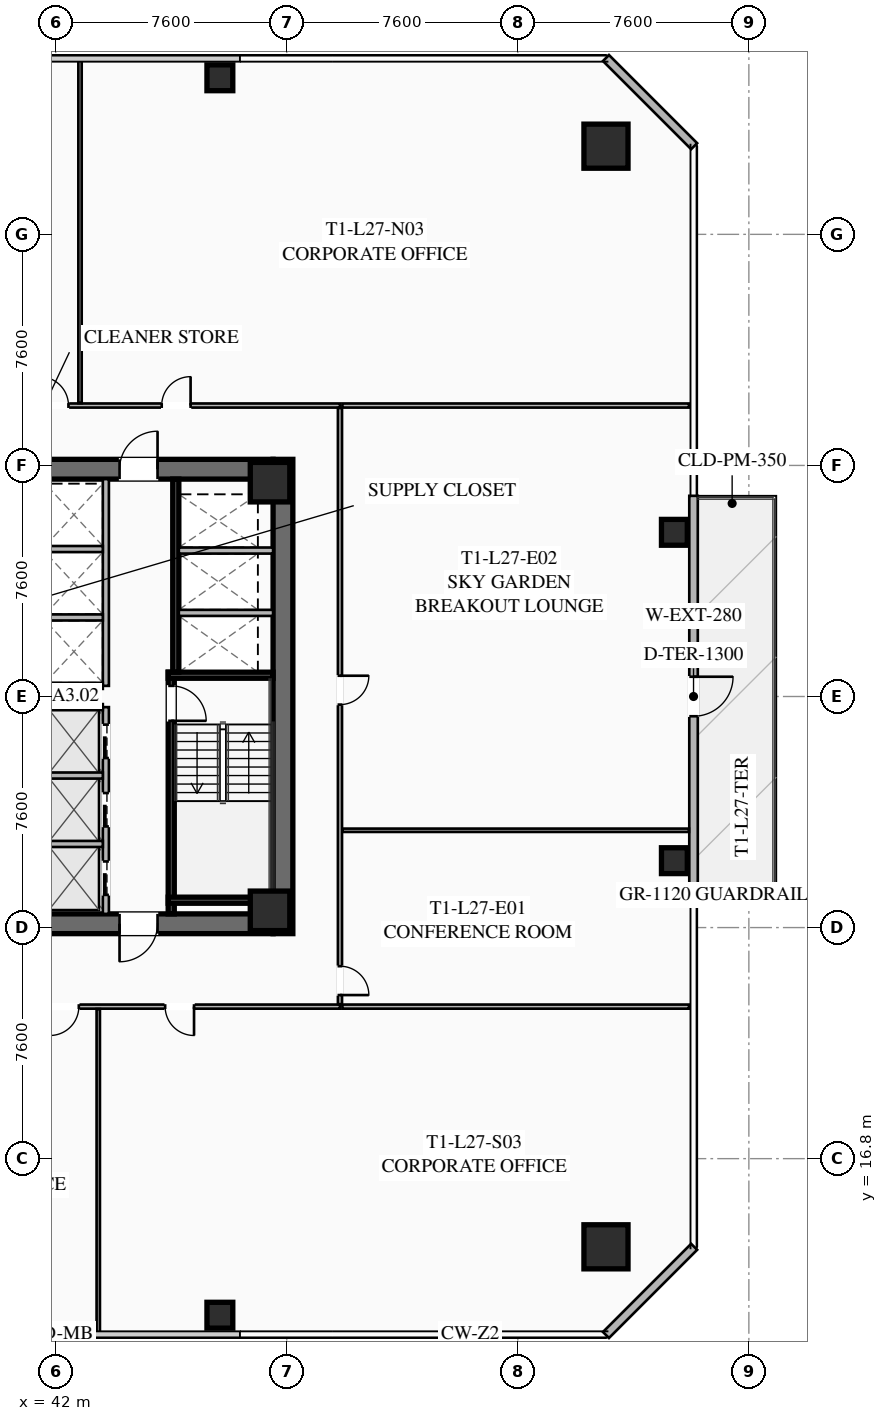
"""IFC4 building model, lengths in metres.
Left out: names, types, materials, properties, quantities, classifications, styles, units other than length and angle.
Written with IfcOpenShell. Run it as: python <this file> out.ifc"""

import sys

from ifc_helpers import new_model, si_unit, direction, frame, frame_2d, origin, origin_2d, place, context, subcontext, project, spatial, rectangle, hollow_rectangle, extrude, element, fill, save


model = new_model("IFC4")
c1 = context("Model", 3, precision=1e-05, world=origin(), true_north=direction((0.0, 1.0)))
c2 = subcontext(c1, "Body", "Model", "MODEL_VIEW")
j1 = project(units=[si_unit("LENGTHUNIT", "METRE"), si_unit("PLANEANGLEUNIT", "RADIAN")], contexts=[c1])
p1 = place(None, origin())
s1 = spatial("IfcSite", under=j1, at=p1, CompositionType="ELEMENT")
p2 = place(p1, origin())
s2 = spatial("IfcBuilding", under=s1, at=p2, CompositionType="ELEMENT")
p3 = place(p2, frame((0.0, 0.0, 102.7)))
s3 = spatial("IfcBuildingStorey", under=s2, at=p3, CompositionType="ELEMENT", Elevation=102.7)
p4 = place(p3, frame((49.475, 39.8, 0.0), z_axis=(0.0, 0.0, 1.0), x_axis=(0.0, -1.0, 0.0)))
e1 = element("IfcWall", 1, at=p4, inside=s3, PredefinedType="SHEAR", context=c2, shape_type="SweptSolid", body=[
    extrude(rectangle(XDim=15.6, YDim=0.65, at=frame_2d((7.8, 0.0))), origin(), (0.0, 0.0, 1.0), 3.55),
])
p5 = place(p3, frame((49.15, 24.525, 0.0), z_axis=(0.0, 0.0, 1.0), x_axis=(-1.0, 0.0, 0.0)))
e2 = element("IfcWall", 2, at=p5, inside=s3, PredefinedType="SHEAR", context=c2, shape_type="SweptSolid", body=[
    extrude(rectangle(XDim=14.3, YDim=0.65, at=frame_2d((7.15, 0.0))), origin(), (0.0, 0.0, 1.0), 3.55),
])
p6 = place(p5, frame((8.85, 0.0, 0.0)))
e3 = element("IfcOpeningElement", 3, at=p6, cuts=e2, PredefinedType="OPENING", context=c2, shape_type="SweptSolid", body=[
    extrude(rectangle(XDim=1.25, YDim=2.25, at=frame_2d((0.625, 1.125))), frame((0.0, 0.335, 0.0), z_axis=(0.0, -1.0, 0.0), x_axis=(1.0, 0.0, 0.0)), (0.0, 0.0, 1.0), 0.67),
])
p7 = place(p5, frame((3.8, 0.0, 0.0)))
e4 = element("IfcOpeningElement", 4, at=p7, cuts=e2, PredefinedType="OPENING", context=c2, shape_type="SweptSolid", body=[
    extrude(rectangle(XDim=1.25, YDim=2.25, at=frame_2d((0.625, 1.125))), frame((0.0, 0.335, 0.0), z_axis=(0.0, -1.0, 0.0), x_axis=(1.0, 0.0, 0.0)), (0.0, 0.0, 1.0), 0.67),
])
p8 = place(p3, frame((34.85, 39.475, 0.0), z_axis=(0.0, 0.0, 1.0), x_axis=(1.0, 0.0, 0.0)))
e5 = element("IfcWall", 5, at=p8, inside=s3, PredefinedType="SHEAR", context=c2, shape_type="SweptSolid", body=[
    extrude(rectangle(XDim=14.3, YDim=0.65, at=frame_2d((7.15, 0.0))), origin(), (0.0, 0.0, 1.0), 3.55),
])
p9 = place(p8, frame((4.2, 0.0, 0.0)))
e6 = element("IfcOpeningElement", 6, at=p9, cuts=e5, PredefinedType="OPENING", context=c2, shape_type="SweptSolid", body=[
    extrude(rectangle(XDim=1.25, YDim=2.25, at=frame_2d((0.625, 1.125))), frame((0.0, 0.335, 0.0), z_axis=(0.0, -1.0, 0.0), x_axis=(1.0, 0.0, 0.0)), (0.0, 0.0, 1.0), 0.67),
])
p10 = place(p8, frame((9.25, 0.0, 0.0)))
e7 = element("IfcOpeningElement", 7, at=p10, cuts=e5, PredefinedType="OPENING", context=c2, shape_type="SweptSolid", body=[
    extrude(rectangle(XDim=1.25, YDim=2.25, at=frame_2d((0.625, 1.125))), frame((0.0, 0.335, 0.0), z_axis=(0.0, -1.0, 0.0), x_axis=(1.0, 0.0, 0.0)), (0.0, 0.0, 1.0), 0.67),
])
for number, where, z_axis, x_axis in (
    (8, (49.05, 24.95, 0.0), (0.0, 0.0, 1.0), (1.0, 0.0, 0.0)),
    (9, (49.05, 39.05, 0.0), (0.0, 0.0, 1.0), (1.0, 0.0, 0.0)),
):
    element("IfcColumn", number, at=place(p3, frame(where, z_axis=z_axis, x_axis=x_axis)), inside=s3, PredefinedType="COLUMN", context=c2, shape_type="SweptSolid", body=[
        extrude(hollow_rectangle(XDim=1.3, YDim=1.3, WallThickness=0.05, at=origin_2d()), origin(), (0.0, 0.0, 1.0), 3.35),
    ])
for number, where, z_axis, x_axis in (
    (10, (60.1, 13.9, 0.0), (0.0, 0.0, 1.0), (1.0, 0.0, 0.0)),
    (11, (60.1, 50.1, 0.0), (0.0, 0.0, 1.0), (1.0, 0.0, 0.0)),
):
    element("IfcColumn", number, at=place(p3, frame(where, z_axis=z_axis, x_axis=x_axis)), inside=s3, PredefinedType="COLUMN", context=c2, shape_type="SweptSolid", body=[
        extrude(hollow_rectangle(XDim=1.45, YDim=1.45, WallThickness=0.055, at=origin_2d()), origin(), (0.0, 0.0, 1.0), 3.35),
    ])
for number, where, z_axis, x_axis in (
    (12, (47.4, 11.65, 0.0), (0.0, 0.0, 1.0), (1.0, 0.0, 0.0)),
    (13, (62.35, 26.6, 0.0), (0.0, 0.0, 1.0), (1.0, 0.0, 0.0)),
    (14, (62.35, 37.4, 0.0), (0.0, 0.0, 1.0), (1.0, 0.0, 0.0)),
    (15, (47.4, 52.35, 0.0), (0.0, 0.0, 1.0), (1.0, 0.0, 0.0)),
):
    element("IfcColumn", number, at=place(p3, frame(where, z_axis=z_axis, x_axis=x_axis)), inside=s3, PredefinedType="COLUMN", context=c2, shape_type="SweptSolid", body=[
        extrude(hollow_rectangle(XDim=0.85, YDim=0.85, WallThickness=0.035, at=origin_2d()), origin(), (0.0, 0.0, 1.0), 3.35),
    ])
p11 = place(p3, frame((62.98, 38.6, 0.0), z_axis=(0.0, 0.0, 1.0), x_axis=(0.0, -1.0, 0.0)))
e16 = element("IfcWall", 16, at=p11, inside=s3, PredefinedType="SOLIDWALL", context=c2, shape_type="SweptSolid", body=[
    extrude(rectangle(XDim=13.2, YDim=0.28, at=frame_2d((6.6, 0.0))), origin(), (0.0, 0.0, 1.0), 3.35),
])
p12 = place(p11, frame((5.95, 0.0, 0.0)))
e17 = element("IfcOpeningElement", 17, at=p12, cuts=e16, PredefinedType="OPENING", context=c2, shape_type="SweptSolid", body=[
    extrude(rectangle(XDim=1.3, YDim=2.15, at=frame_2d((0.65, 1.075))), frame((0.0, 0.15, 0.0), z_axis=(0.0, -1.0, 0.0), x_axis=(1.0, 0.0, 0.0)), (0.0, 0.0, 1.0), 0.3),
])
for number, where, z_axis, x_axis in (
    (18, (60.1, 53.0, 0.0), (0.0, 0.0, 1.0), (0.707, -0.707, 0.0)),
    (19, (63.0, 13.9, 0.0), (0.0, 0.0, 1.0), (-0.707, -0.707, 0.0)),
):
    element("IfcWall", number, at=place(p3, frame(where, z_axis=z_axis, x_axis=x_axis)), inside=s3, PredefinedType="SOLIDWALL", context=c2, shape_type="SweptSolid", body=[
        extrude(rectangle(XDim=4.101, YDim=0.28, at=frame_2d((2.051, 0.0))), origin(), (0.0, 0.0, 1.0), 3.35),
    ])
p13 = place(p3, frame((45.8, 32.8, 0.0), z_axis=(0.0, 0.0, 1.0), x_axis=(0.0, -1.0, 0.0)))
e20 = element("IfcWall", 20, at=p13, inside=s3, PredefinedType="SHEAR", context=c2, shape_type="SweptSolid", body=[
    extrude(rectangle(XDim=7.95, YDim=0.2, at=frame_2d((3.975, 0.0))), origin(), (0.0, 0.0, 1.0), 3.35),
])
p14 = place(p13, frame((0.45, 0.0, 0.0)))
e21 = element("IfcOpeningElement", 21, at=p14, cuts=e20, PredefinedType="OPENING", context=c2, shape_type="SweptSolid", body=[
    extrude(rectangle(XDim=1.15, YDim=2.2, at=frame_2d((0.575, 1.1))), frame((0.0, 0.11, 0.0), z_axis=(0.0, -1.0, 0.0), x_axis=(1.0, 0.0, 0.0)), (0.0, 0.0, 1.0), 0.22),
])
for number, where, z_axis, x_axis in (
    (22, (45.7, 32.7, 0.0), (0.0, 0.0, 1.0), (1.0, 0.0, 0.0)),
    (23, (45.7, 25.3, 0.0), (0.0, 0.0, 1.0), (1.0, 0.0, 0.0)),
):
    element("IfcWall", number, at=place(p3, frame(where, z_axis=z_axis, x_axis=x_axis)), inside=s3, PredefinedType="SHEAR", context=c2, shape_type="SweptSolid", body=[
        extrude(rectangle(XDim=3.45, YDim=0.2, at=frame_2d((1.725, 0.0))), origin(), (0.0, 0.0, 1.0), 3.35),
    ])
p15 = place(p3, frame((45.95, 39.15, 0.0), z_axis=(0.0, 0.0, 1.0), x_axis=(0.0, -1.0, 0.0)))
e24 = element("IfcWall", 24, at=p15, inside=s3, PredefinedType="SHEAR", context=c2, shape_type="SweptSolid", body=[
    extrude(rectangle(XDim=6.35, YDim=0.2, at=frame_2d((3.175, 0.0))), origin(), (0.0, 0.0, 1.0), 3.35),
])
for number, where, z_axis, x_axis in (
    (25, (46.05, 34.75, 0.0), (0.0, 0.0, 1.0), (1.0, 0.0, 0.0)),
    (26, (46.05, 36.8, 0.0), (0.0, 0.0, 1.0), (1.0, 0.0, 0.0)),
):
    element("IfcWall", number, at=place(p3, frame(where, z_axis=z_axis, x_axis=x_axis)), inside=s3, PredefinedType="SOLIDWALL", context=c2, shape_type="SweptSolid", body=[
        extrude(rectangle(XDim=3.1, YDim=0.2, at=frame_2d((1.55, 0.0))), origin(), (0.0, 0.0, 1.0), 3.35),
    ])
p16 = place(p3, frame((43.65, 24.85, 0.0), z_axis=(0.0, 0.0, 1.0), x_axis=(0.0, 1.0, 0.0)))
e27 = element("IfcWall", 27, at=p16, inside=s3, PredefinedType="SOLIDWALL", context=c2, shape_type="SweptSolid", body=[
    extrude(rectangle(XDim=6.8, YDim=0.2, at=frame_2d((3.4, 0.0))), origin(), (0.0, 0.0, 1.0), 3.35),
])
p17 = place(p16, frame((0.625, 0.0, 0.0)))
e28 = element("IfcOpeningElement", 28, at=p17, cuts=e27, PredefinedType="OPENING", context=c2, shape_type="SweptSolid", body=[
    extrude(rectangle(XDim=1.1, YDim=2.2, at=frame_2d((0.55, 1.1))), frame((0.0, 0.11, 0.0), z_axis=(0.0, -1.0, 0.0), x_axis=(1.0, 0.0, 0.0)), (0.0, 0.0, 1.0), 0.22),
])
p18 = place(p16, frame((2.875, 0.0, 0.0)))
e29 = element("IfcOpeningElement", 29, at=p18, cuts=e27, PredefinedType="OPENING", context=c2, shape_type="SweptSolid", body=[
    extrude(rectangle(XDim=1.1, YDim=2.2, at=frame_2d((0.55, 1.1))), frame((0.0, 0.11, 0.0), z_axis=(0.0, -1.0, 0.0), x_axis=(1.0, 0.0, 0.0)), (0.0, 0.0, 1.0), 0.22),
])
p19 = place(p16, frame((5.125, 0.0, 0.0)))
e30 = element("IfcOpeningElement", 30, at=p19, cuts=e27, PredefinedType="OPENING", context=c2, shape_type="SweptSolid", body=[
    extrude(rectangle(XDim=1.1, YDim=2.2, at=frame_2d((0.55, 1.1))), frame((0.0, 0.11, 0.0), z_axis=(0.0, -1.0, 0.0), x_axis=(1.0, 0.0, 0.0)), (0.0, 0.0, 1.0), 0.22),
])
for number, where, z_axis, x_axis in (
    (31, (41.67, 27.15, 0.0), (0.0, 0.0, 1.0), (1.0, 0.0, 0.0)),
    (32, (41.67, 29.4, 0.0), (0.0, 0.0, 1.0), (1.0, 0.0, 0.0)),
    (33, (41.67, 31.65, 0.0), (0.0, 0.0, 1.0), (1.0, 0.0, 0.0)),
):
    element("IfcWall", number, at=place(p3, frame(where, z_axis=z_axis, x_axis=x_axis)), inside=s3, PredefinedType="SOLIDWALL", context=c2, shape_type="SweptSolid", body=[
        extrude(rectangle(XDim=1.88, YDim=0.2, at=frame_2d((0.94, 0.0))), origin(), (0.0, 0.0, 1.0), 3.35),
    ])
p20 = place(p3, frame((43.65, 32.35, 0.0), z_axis=(0.0, 0.0, 1.0), x_axis=(0.0, 1.0, 0.0)))
e34 = element("IfcWall", 34, at=p20, inside=s3, PredefinedType="SOLIDWALL", context=c2, shape_type="SweptSolid", body=[
    extrude(rectangle(XDim=6.8, YDim=0.2, at=frame_2d((3.4, 0.0))), origin(), (0.0, 0.0, 1.0), 3.35),
])
for number, where, z_axis, x_axis in (
    (35, (41.67, 32.35, 0.0), (0.0, 0.0, 1.0), (1.0, 0.0, 0.0)),
    (36, (41.67, 34.6, 0.0), (0.0, 0.0, 1.0), (1.0, 0.0, 0.0)),
    (37, (41.67, 36.85, 0.0), (0.0, 0.0, 1.0), (1.0, 0.0, 0.0)),
):
    element("IfcWall", number, at=place(p3, frame(where, z_axis=z_axis, x_axis=x_axis)), inside=s3, PredefinedType="SOLIDWALL", context=c2, shape_type="SweptSolid", body=[
        extrude(rectangle(XDim=1.88, YDim=0.2, at=frame_2d((0.94, 0.0))), origin(), (0.0, 0.0, 1.0), 3.35),
    ])
p21 = place(p3, frame((24.05, 41.57, 0.0), z_axis=(0.0, 0.0, 1.0), x_axis=(1.0, 0.0, 0.0)))
e38 = element("IfcWall", 38, at=p21, inside=s3, PredefinedType="PARTITIONING", context=c2, shape_type="SweptSolid", body=[
    extrude(rectangle(XDim=27.3, YDim=0.135, at=frame_2d((13.65, 0.0))), origin(), (0.0, 0.0, 1.0), 2.703),
])
p22 = place(p21, frame((0.3, 0.0, 0.0)))
e39 = element("IfcOpeningElement", 39, at=p22, cuts=e38, PredefinedType="OPENING", context=c2, shape_type="SweptSolid", body=[
    extrude(rectangle(XDim=0.95, YDim=2.05, at=frame_2d((0.475, 1.025))), frame((0.0, 0.077, 0.0), z_axis=(0.0, -1.0, 0.0), x_axis=(1.0, 0.0, 0.0)), (0.0, 0.0, 1.0), 0.155),
])
p23 = place(p21, frame((17.42, 0.0, 0.0)))
e40 = element("IfcOpeningElement", 40, at=p23, cuts=e38, PredefinedType="OPENING", context=c2, shape_type="SweptSolid", body=[
    extrude(rectangle(XDim=0.95, YDim=2.05, at=frame_2d((0.475, 1.025))), frame((0.0, 0.077, 0.0), z_axis=(0.0, -1.0, 0.0), x_axis=(1.0, 0.0, 0.0)), (0.0, 0.0, 1.0), 0.155),
])
p24 = place(p21, frame((21.437, 0.0, 0.0)))
e41 = element("IfcOpeningElement", 41, at=p24, cuts=e38, PredefinedType="OPENING", context=c2, shape_type="SweptSolid", body=[
    extrude(rectangle(XDim=0.95, YDim=2.05, at=frame_2d((0.475, 1.025))), frame((0.0, 0.077, 0.0), z_axis=(0.0, -1.0, 0.0), x_axis=(1.0, 0.0, 0.0)), (0.0, 0.0, 1.0), 0.155),
])
p25 = place(p3, frame((42.8, 41.65, 0.0), z_axis=(0.0, 0.0, 1.0), x_axis=(0.0, 1.0, 0.0)))
e42 = element("IfcWall", 42, at=p25, inside=s3, PredefinedType="PARTITIONING", context=c2, shape_type="SweptSolid", body=[
    extrude(rectangle(XDim=11.33, YDim=0.11, at=frame_2d((5.665, 0.0))), origin(), (0.0, 0.0, 1.0), 2.703),
])
p26 = place(p3, frame((51.35, 21.8, 0.0), z_axis=(0.0, 0.0, 1.0), x_axis=(-1.0, 0.0, 0.0)))
e43 = element("IfcWall", 43, at=p26, inside=s3, PredefinedType="PARTITIONING", context=c2, shape_type="SweptSolid", body=[
    extrude(rectangle(XDim=27.3, YDim=0.135, at=frame_2d((13.65, 0.0))), origin(), (0.0, 0.0, 1.0), 2.703),
])
p27 = place(p26, frame((25.97, 0.0, 0.0)))
e44 = element("IfcOpeningElement", 44, at=p27, cuts=e43, PredefinedType="OPENING", context=c2, shape_type="SweptSolid", body=[
    extrude(rectangle(XDim=0.95, YDim=2.05, at=frame_2d((0.475, 1.025))), frame((0.0, 0.077, 0.0), z_axis=(0.0, -1.0, 0.0), x_axis=(1.0, 0.0, 0.0)), (0.0, 0.0, 1.0), 0.155),
])
p28 = place(p26, frame((8.59, 0.0, 0.0)))
e45 = element("IfcOpeningElement", 45, at=p28, cuts=e43, PredefinedType="OPENING", context=c2, shape_type="SweptSolid", body=[
    extrude(rectangle(XDim=0.95, YDim=2.05, at=frame_2d((0.475, 1.025))), frame((0.0, 0.077, 0.0), z_axis=(0.0, -1.0, 0.0), x_axis=(1.0, 0.0, 0.0)), (0.0, 0.0, 1.0), 0.155),
])
p29 = place(p26, frame((4.8, 0.0, 0.0)))
e46 = element("IfcOpeningElement", 46, at=p29, cuts=e43, PredefinedType="OPENING", context=c2, shape_type="SweptSolid", body=[
    extrude(rectangle(XDim=0.95, YDim=2.05, at=frame_2d((0.475, 1.025))), frame((0.0, 0.077, 0.0), z_axis=(0.0, -1.0, 0.0), x_axis=(1.0, 0.0, 0.0)), (0.0, 0.0, 1.0), 0.155),
])
p30 = place(p3, frame((43.4, 11.02, 0.0), z_axis=(0.0, 0.0, 1.0), x_axis=(0.0, 1.0, 0.0)))
e47 = element("IfcWall", 47, at=p30, inside=s3, PredefinedType="PARTITIONING", context=c2, shape_type="SweptSolid", body=[
    extrude(rectangle(XDim=10.7, YDim=0.11, at=frame_2d((5.35, 0.0))), origin(), (0.0, 0.0, 1.0), 2.703),
])
p31 = place(p3, frame((51.35, 41.49, 0.0), z_axis=(0.0, 0.0, 1.0), x_axis=(0.0, -1.0, 0.0)))
e48 = element("IfcWall", 48, at=p31, inside=s3, PredefinedType="PARTITIONING", context=c2, shape_type="SweptSolid", body=[
    extrude(rectangle(XDim=19.61, YDim=0.135, at=frame_2d((9.805, 0.0))), origin(), (0.0, 0.0, 1.0), 2.703),
])
p32 = place(p31, frame((18.36, 0.0, 0.0)))
e49 = element("IfcOpeningElement", 49, at=p32, cuts=e48, PredefinedType="OPENING", context=c2, shape_type="SweptSolid", body=[
    extrude(rectangle(XDim=0.95, YDim=2.05, at=frame_2d((0.475, 1.025))), frame((0.0, 0.077, 0.0), z_axis=(0.0, -1.0, 0.0), x_axis=(1.0, 0.0, 0.0)), (0.0, 0.0, 1.0), 0.155),
])
p33 = place(p31, frame((8.807, 0.0, 0.0)))
e50 = element("IfcOpeningElement", 50, at=p33, cuts=e48, PredefinedType="OPENING", context=c2, shape_type="SweptSolid", body=[
    extrude(rectangle(XDim=0.95, YDim=2.05, at=frame_2d((0.475, 1.025))), frame((0.0, 0.077, 0.0), z_axis=(0.0, -1.0, 0.0), x_axis=(1.0, 0.0, 0.0)), (0.0, 0.0, 1.0), 0.155),
])
for number, where, z_axis, x_axis in (
    (51, (62.83, 41.57, 0.0), (0.0, 0.0, 1.0), (-1.0, 0.0, 0.0)),
    (52, (51.43, 21.8, 0.0), (0.0, 0.0, 1.0), (1.0, 0.0, 0.0)),
):
    element("IfcWall", number, at=place(p3, frame(where, z_axis=z_axis, x_axis=x_axis)), inside=s3, PredefinedType="PARTITIONING", context=c2, shape_type="SweptSolid", body=[
        extrude(rectangle(XDim=11.4, YDim=0.135, at=frame_2d((5.7, 0.0))), origin(), (0.0, 0.0, 1.0), 2.703),
    ])
p34 = place(p3, frame((51.43, 27.6, 0.0), z_axis=(0.0, 0.0, 1.0), x_axis=(1.0, 0.0, 0.0)))
e53 = element("IfcWall", 53, at=p34, inside=s3, PredefinedType="PARTITIONING", context=c2, shape_type="SweptSolid", body=[
    extrude(rectangle(XDim=11.4, YDim=0.11, at=frame_2d((5.7, 0.0))), origin(), (0.0, 0.0, 1.0), 2.703),
])
p35 = place(p12, origin())
e54 = element("IfcDoor", 54, at=p35, inside=s3, OperationType="SINGLE_SWING_LEFT", PredefinedType="DOOR", context=c2, shape_type="SweptSolid", body=[
    extrude(rectangle(XDim=1.3, YDim=2.15, at=frame_2d((0.65, 1.075))), frame((0.0, 0.025, 0.0), z_axis=(0.0, -1.0, 0.0), x_axis=(1.0, 0.0, 0.0)), (0.0, 0.0, 1.0), 0.05),
])
fill(e17, e54)
p36 = place(p10, origin())
e55 = element("IfcDoor", 55, at=p36, inside=s3, OperationType="SINGLE_SWING_RIGHT", PredefinedType="DOOR", context=c2, shape_type="SweptSolid", body=[
    extrude(rectangle(XDim=1.25, YDim=2.25, at=frame_2d((0.625, 1.125))), frame((0.0, 0.025, 0.0), z_axis=(0.0, -1.0, 0.0), x_axis=(1.0, 0.0, 0.0)), (0.0, 0.0, 1.0), 0.05),
])
fill(e7, e55)
p37 = place(p7, origin())
e56 = element("IfcDoor", 56, at=p37, inside=s3, OperationType="SINGLE_SWING_RIGHT", PredefinedType="DOOR", context=c2, shape_type="SweptSolid", body=[
    extrude(rectangle(XDim=1.25, YDim=2.25, at=frame_2d((0.625, 1.125))), frame((0.0, 0.025, 0.0), z_axis=(0.0, -1.0, 0.0), x_axis=(1.0, 0.0, 0.0)), (0.0, 0.0, 1.0), 0.05),
])
fill(e4, e56)
p38 = place(p14, origin())
e57 = element("IfcDoor", 57, at=p38, inside=s3, OperationType="SINGLE_SWING_RIGHT", PredefinedType="DOOR", context=c2, shape_type="SweptSolid", body=[
    extrude(rectangle(XDim=1.15, YDim=2.2, at=frame_2d((0.575, 1.1))), frame((0.0, 0.025, 0.0), z_axis=(0.0, -1.0, 0.0), x_axis=(1.0, 0.0, 0.0)), (0.0, 0.0, 1.0), 0.05),
])
fill(e21, e57)
p39 = place(p23, origin())
e58 = element("IfcDoor", 58, at=p39, inside=s3, OperationType="SINGLE_SWING_LEFT", PredefinedType="DOOR", context=c2, shape_type="SweptSolid", body=[
    extrude(rectangle(XDim=0.95, YDim=2.05, at=frame_2d((0.475, 1.025))), frame((0.0, 0.025, 0.0), z_axis=(0.0, -1.0, 0.0), x_axis=(1.0, 0.0, 0.0)), (0.0, 0.0, 1.0), 0.05),
])
fill(e40, e58)
p40 = place(p24, origin())
e59 = element("IfcDoor", 59, at=p40, inside=s3, OperationType="SINGLE_SWING_RIGHT", PredefinedType="DOOR", context=c2, shape_type="SweptSolid", body=[
    extrude(rectangle(XDim=0.95, YDim=2.05, at=frame_2d((0.475, 1.025))), frame((0.0, 0.025, 0.0), z_axis=(0.0, -1.0, 0.0), x_axis=(1.0, 0.0, 0.0)), (0.0, 0.0, 1.0), 0.05),
])
fill(e41, e59)
p41 = place(p28, origin())
e60 = element("IfcDoor", 60, at=p41, inside=s3, OperationType="SINGLE_SWING_RIGHT", PredefinedType="DOOR", context=c2, shape_type="SweptSolid", body=[
    extrude(rectangle(XDim=0.95, YDim=2.05, at=frame_2d((0.475, 1.025))), frame((0.0, 0.025, 0.0), z_axis=(0.0, -1.0, 0.0), x_axis=(1.0, 0.0, 0.0)), (0.0, 0.0, 1.0), 0.05),
])
fill(e45, e60)
p42 = place(p29, origin())
e61 = element("IfcDoor", 61, at=p42, inside=s3, OperationType="SINGLE_SWING_LEFT", PredefinedType="DOOR", context=c2, shape_type="SweptSolid", body=[
    extrude(rectangle(XDim=0.95, YDim=2.05, at=frame_2d((0.475, 1.025))), frame((0.0, 0.025, 0.0), z_axis=(0.0, -1.0, 0.0), x_axis=(1.0, 0.0, 0.0)), (0.0, 0.0, 1.0), 0.05),
])
fill(e46, e61)
p43 = place(p32, origin())
e62 = element("IfcDoor", 62, at=p43, inside=s3, OperationType="SINGLE_SWING_RIGHT", PredefinedType="DOOR", context=c2, shape_type="SweptSolid", body=[
    extrude(rectangle(XDim=0.95, YDim=2.05, at=frame_2d((0.475, 1.025))), frame((0.0, 0.025, 0.0), z_axis=(0.0, -1.0, 0.0), x_axis=(1.0, 0.0, 0.0)), (0.0, 0.0, 1.0), 0.05),
])
fill(e49, e62)
p44 = place(p33, origin())
e63 = element("IfcDoor", 63, at=p44, inside=s3, OperationType="SINGLE_SWING_LEFT", PredefinedType="DOOR", context=c2, shape_type="SweptSolid", body=[
    extrude(rectangle(XDim=0.95, YDim=2.05, at=frame_2d((0.475, 1.025))), frame((0.0, 0.025, 0.0), z_axis=(0.0, -1.0, 0.0), x_axis=(1.0, 0.0, 0.0)), (0.0, 0.0, 1.0), 0.05),
])
fill(e50, e63)
p45 = place(p17, origin())
e64 = element("IfcDoor", 64, at=p45, inside=s3, OperationType="SLIDING_TO_LEFT", PredefinedType="DOOR", context=c2, shape_type="SweptSolid", body=[
    extrude(rectangle(XDim=1.1, YDim=2.2, at=frame_2d((0.55, 1.1))), frame((0.0, 0.025, 0.0), z_axis=(0.0, -1.0, 0.0), x_axis=(1.0, 0.0, 0.0)), (0.0, 0.0, 1.0), 0.05),
])
fill(e28, e64)
p46 = place(p18, origin())
e65 = element("IfcDoor", 65, at=p46, inside=s3, OperationType="SLIDING_TO_LEFT", PredefinedType="DOOR", context=c2, shape_type="SweptSolid", body=[
    extrude(rectangle(XDim=1.1, YDim=2.2, at=frame_2d((0.55, 1.1))), frame((0.0, 0.025, 0.0), z_axis=(0.0, -1.0, 0.0), x_axis=(1.0, 0.0, 0.0)), (0.0, 0.0, 1.0), 0.05),
])
fill(e29, e65)
p47 = place(p19, origin())
e66 = element("IfcDoor", 66, at=p47, inside=s3, OperationType="SLIDING_TO_LEFT", PredefinedType="DOOR", context=c2, shape_type="SweptSolid", body=[
    extrude(rectangle(XDim=1.1, YDim=2.2, at=frame_2d((0.55, 1.1))), frame((0.0, 0.025, 0.0), z_axis=(0.0, -1.0, 0.0), x_axis=(1.0, 0.0, 0.0)), (0.0, 0.0, 1.0), 0.05),
])
fill(e30, e66)
save(model, sys.argv[1])
